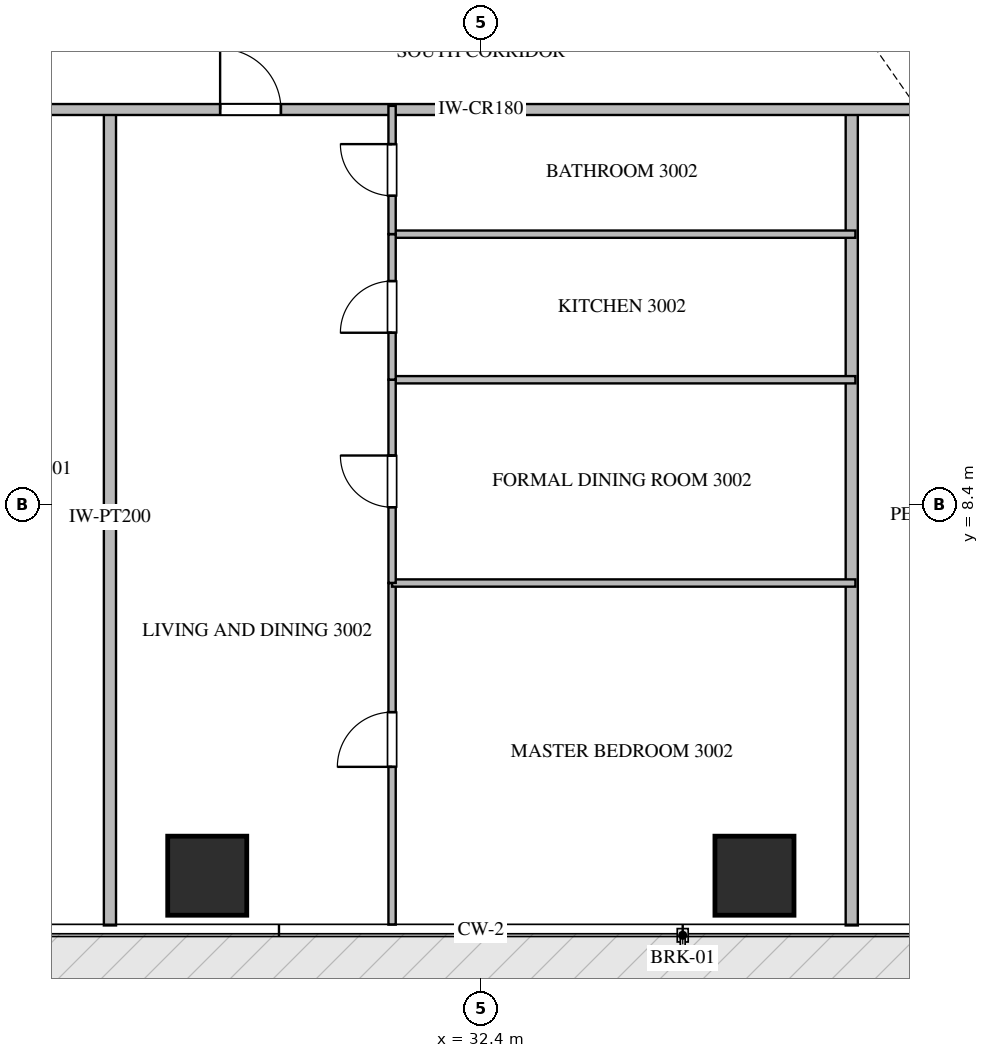
"""IFC4 building model, lengths in metres.
Left out: names, types, materials, properties, quantities, classifications, styles, units other than length and angle.
Written with IfcOpenShell. Run it as: python <this file> out.ifc"""

import sys

from ifc_helpers import new_model, si_unit, direction, frame, frame_2d, origin, origin_2d, place, context, subcontext, project, spatial, rectangle, extrude, source, transform, mapped, element, fill, save


model = new_model("IFC4")
c1 = context("Model", 3, precision=1e-05, world=origin(), true_north=direction((0.0, 1.0)))
c2 = subcontext(c1, "Body", "Model", "MODEL_VIEW")
j1 = project(units=[si_unit("LENGTHUNIT", "METRE"), si_unit("PLANEANGLEUNIT", "RADIAN")], contexts=[c1])
p1 = place(None, origin())
s1 = spatial("IfcSite", under=j1, at=p1, CompositionType="ELEMENT")
p2 = place(p1, origin())
s2 = spatial("IfcBuilding", under=s1, at=p2, CompositionType="ELEMENT")
p3 = place(p2, frame((0.0, 0.0, 123.9)))
s3 = spatial("IfcBuildingStorey", under=s2, at=p3, CompositionType="ELEMENT", Elevation=123.9)
m1 = source(origin(), c2, "Body", "SweptSolid", [
    extrude(rectangle(XDim=1.3, YDim=1.3, at=origin_2d()), origin(), (0.0, 0.0, 1.0), 3.75),
])
for number, where, z_axis, x_axis in (
    (1, (27.9, 2.3, -0.26), (0.0, 0.0, 1.0), (1.0, 0.0, 0.0)),
    (2, (36.9, 2.3, -0.26), (0.0, 0.0, 1.0), (1.0, 0.0, 0.0)),
):
    element("IfcColumn", number, at=place(p3, frame(where, z_axis=z_axis, x_axis=x_axis)), inside=s3, PredefinedType="COLUMN", context=c2, shape_type="MappedRepresentation", body=[
        mapped(m1, transform((0.0, 0.0, 0.0), scale=1.0)),
    ])
for number, where, z_axis, x_axis in (
    (3, (26.3, 1.482, 0.0), (0.0, 0.0, 1.0), (0.0, 1.0, 0.0)),
    (4, (38.5, 1.482, 0.0), (0.0, 0.0, 1.0), (0.0, 1.0, 0.0)),
):
    element("IfcWall", number, at=place(p3, frame(where, z_axis=z_axis, x_axis=x_axis)), inside=s3, PredefinedType="PARTITIONING", context=c2, shape_type="SweptSolid", body=[
        extrude(rectangle(XDim=13.418, YDim=0.2, at=frame_2d((6.709, 0.0))), origin(), (0.0, 0.0, 1.0), 3.49),
    ])
p4 = place(p3, frame((20.952, 14.9, 0.0), z_axis=(0.0, 0.0, 1.0), x_axis=(1.0, 0.0, 0.0)))
e5 = element("IfcWall", 5, at=p4, inside=s3, PredefinedType="PARTITIONING", context=c2, shape_type="SweptSolid", body=[
    extrude(rectangle(XDim=22.896, YDim=0.18, at=frame_2d((11.448, 0.0))), origin(), (0.0, 0.0, 1.0), 3.49),
])
p5 = place(p4, frame((2.781, 0.0, 0.0)))
e6 = element("IfcOpeningElement", 6, at=p5, cuts=e5, PredefinedType="OPENING", context=c2, shape_type="SweptSolid", body=[
    extrude(rectangle(XDim=1.0, YDim=2.15, at=frame_2d((0.5, 1.075))), frame((0.0, 0.1, 0.0), z_axis=(0.0, -1.0, 0.0), x_axis=(1.0, 0.0, 0.0)), (0.0, 0.0, 1.0), 0.2),
])
p6 = place(p4, frame((7.16, 0.0, 0.0)))
e7 = element("IfcOpeningElement", 7, at=p6, cuts=e5, PredefinedType="OPENING", context=c2, shape_type="SweptSolid", body=[
    extrude(rectangle(XDim=1.0, YDim=2.15, at=frame_2d((0.5, 1.075))), frame((0.0, 0.1, 0.0), z_axis=(0.0, -1.0, 0.0), x_axis=(1.0, 0.0, 0.0)), (0.0, 0.0, 1.0), 0.2),
])
p7 = place(p4, frame((19.115, 0.0, 0.0)))
e8 = element("IfcOpeningElement", 8, at=p7, cuts=e5, PredefinedType="OPENING", context=c2, shape_type="SweptSolid", body=[
    extrude(rectangle(XDim=1.0, YDim=2.15, at=frame_2d((0.5, 1.075))), frame((0.0, 0.1, 0.0), z_axis=(0.0, -1.0, 0.0), x_axis=(1.0, 0.0, 0.0)), (0.0, 0.0, 1.0), 0.2),
])
p8 = place(p3, frame((30.94, 1.495, 0.0), z_axis=(0.0, 0.0, 1.0), x_axis=(0.0, 1.0, 0.0)))
e9 = element("IfcWall", 9, at=p8, inside=s3, PredefinedType="PARTITIONING", context=c2, shape_type="SweptSolid", body=[
    extrude(rectangle(XDim=5.618, YDim=0.12, at=frame_2d((2.809, 0.0))), origin(), (0.0, 0.0, 1.0), 3.49),
])
p9 = place(p8, frame((2.595, 0.0, 0.0)))
e10 = element("IfcOpeningElement", 10, at=p9, cuts=e9, PredefinedType="OPENING", context=c2, shape_type="SweptSolid", body=[
    extrude(rectangle(XDim=0.9, YDim=2.1, at=frame_2d((0.45, 1.05))), frame((0.0, 0.07, 0.0), z_axis=(0.0, -1.0, 0.0), x_axis=(1.0, 0.0, 0.0)), (0.0, 0.0, 1.0), 0.14),
])
p10 = place(p3, frame((30.94, 7.113, 0.0), z_axis=(0.0, 0.0, 1.0), x_axis=(1.0, 0.0, 0.0)))
e11 = element("IfcWall", 11, at=p10, inside=s3, PredefinedType="PARTITIONING", context=c2, shape_type="SweptSolid", body=[
    extrude(rectangle(XDim=7.62, YDim=0.12, at=frame_2d((3.81, 0.0))), origin(), (0.0, 0.0, 1.0), 3.49),
])
p11 = place(p3, frame((30.94, 10.456, 0.0), z_axis=(0.0, 0.0, 1.0), x_axis=(1.0, 0.0, 0.0)))
e12 = element("IfcWall", 12, at=p11, inside=s3, PredefinedType="PARTITIONING", context=c2, shape_type="SweptSolid", body=[
    extrude(rectangle(XDim=7.62, YDim=0.12, at=frame_2d((3.81, 0.0))), origin(), (0.0, 0.0, 1.0), 2.972),
])
p12 = place(p3, frame((30.94, 12.85, 0.0), z_axis=(0.0, 0.0, 1.0), x_axis=(1.0, 0.0, 0.0)))
e13 = element("IfcWall", 13, at=p12, inside=s3, PredefinedType="PARTITIONING", context=c2, shape_type="SweptSolid", body=[
    extrude(rectangle(XDim=7.62, YDim=0.12, at=frame_2d((3.81, 0.0))), origin(), (0.0, 0.0, 1.0), 3.49),
])
p13 = place(p3, frame((30.94, 7.115, 0.0), z_axis=(0.0, 0.0, 1.0), x_axis=(0.0, 1.0, 0.0)))
e14 = element("IfcWall", 14, at=p13, inside=s3, PredefinedType="PARTITIONING", context=c2, shape_type="SweptSolid", body=[
    extrude(rectangle(XDim=3.341, YDim=0.12, at=frame_2d((1.67, 0.0))), origin(), (0.0, 0.0, 1.0), 3.49),
])
p14 = place(p13, frame((1.245, 0.0, 0.0)))
e15 = element("IfcOpeningElement", 15, at=p14, cuts=e14, PredefinedType="OPENING", context=c2, shape_type="SweptSolid", body=[
    extrude(rectangle(XDim=0.85, YDim=2.1, at=frame_2d((0.425, 1.05))), frame((0.0, 0.07, 0.0), z_axis=(0.0, -1.0, 0.0), x_axis=(1.0, 0.0, 0.0)), (0.0, 0.0, 1.0), 0.14),
])
p15 = place(p3, frame((30.94, 10.458, 0.0), z_axis=(0.0, 0.0, 1.0), x_axis=(0.0, 1.0, 0.0)))
e16 = element("IfcWall", 16, at=p15, inside=s3, PredefinedType="PARTITIONING", context=c2, shape_type="SweptSolid", body=[
    extrude(rectangle(XDim=2.392, YDim=0.12, at=frame_2d((1.196, 0.0))), origin(), (0.0, 0.0, 1.0), 3.49),
])
p16 = place(p15, frame((0.771, 0.0, 0.0)))
e17 = element("IfcOpeningElement", 17, at=p16, cuts=e16, PredefinedType="OPENING", context=c2, shape_type="SweptSolid", body=[
    extrude(rectangle(XDim=0.85, YDim=2.1, at=frame_2d((0.425, 1.05))), frame((0.0, 0.07, 0.0), z_axis=(0.0, -1.0, 0.0), x_axis=(1.0, 0.0, 0.0)), (0.0, 0.0, 1.0), 0.14),
])
p17 = place(p3, frame((30.94, 12.852, 0.0), z_axis=(0.0, 0.0, 1.0), x_axis=(0.0, 1.0, 0.0)))
e18 = element("IfcWall", 18, at=p17, inside=s3, PredefinedType="PARTITIONING", context=c2, shape_type="SweptSolid", body=[
    extrude(rectangle(XDim=2.108, YDim=0.12, at=frame_2d((1.054, 0.0))), origin(), (0.0, 0.0, 1.0), 3.49),
])
p18 = place(p17, frame((0.629, 0.0, 0.0)))
e19 = element("IfcOpeningElement", 19, at=p18, cuts=e18, PredefinedType="OPENING", context=c2, shape_type="SweptSolid", body=[
    extrude(rectangle(XDim=0.85, YDim=2.1, at=frame_2d((0.425, 1.05))), frame((0.0, 0.07, 0.0), z_axis=(0.0, -1.0, 0.0), x_axis=(1.0, 0.0, 0.0)), (0.0, 0.0, 1.0), 0.14),
])
m2 = source(origin(), c2, "Body", "SweptSolid", [
    extrude(rectangle(XDim=1.0, YDim=2.15, at=frame_2d((0.5, 1.075))), frame((0.0, 0.025, 0.0), z_axis=(0.0, -1.0, 0.0), x_axis=(1.0, 0.0, 0.0)), (0.0, 0.0, 1.0), 0.05),
])
p19 = place(p6, origin())
e20 = element("IfcDoor", 20, at=p19, inside=s3, OperationType="SINGLE_SWING_LEFT", PredefinedType="DOOR", context=c2, shape_type="MappedRepresentation", body=[
    mapped(m2, transform((0.0, 0.0, 0.0), scale=1.0)),
])
fill(e7, e20)
m3 = source(origin(), c2, "Body", "SweptSolid", [
    extrude(rectangle(XDim=0.9, YDim=2.1, at=frame_2d((0.45, 1.05))), frame((0.0, 0.025, 0.0), z_axis=(0.0, -1.0, 0.0), x_axis=(1.0, 0.0, 0.0)), (0.0, 0.0, 1.0), 0.05),
])
p20 = place(p9, origin())
e21 = element("IfcDoor", 21, at=p20, inside=s3, OperationType="SINGLE_SWING_LEFT", PredefinedType="DOOR", context=c2, shape_type="MappedRepresentation", body=[
    mapped(m3, transform((0.0, 0.0, 0.0), scale=1.0)),
])
fill(e10, e21)
m4 = source(origin(), c2, "Body", "SweptSolid", [
    extrude(rectangle(XDim=0.85, YDim=2.1, at=frame_2d((0.425, 1.05))), frame((0.0, 0.025, 0.0), z_axis=(0.0, -1.0, 0.0), x_axis=(1.0, 0.0, 0.0)), (0.0, 0.0, 1.0), 0.05),
])
p21 = place(p14, origin())
e22 = element("IfcDoor", 22, at=p21, inside=s3, OperationType="SINGLE_SWING_RIGHT", PredefinedType="DOOR", context=c2, shape_type="MappedRepresentation", body=[
    mapped(m4, transform((0.0, 0.0, 0.0), scale=1.0)),
])
fill(e15, e22)
p22 = place(p16, origin())
e23 = element("IfcDoor", 23, at=p22, inside=s3, OperationType="SINGLE_SWING_LEFT", PredefinedType="DOOR", context=c2, shape_type="MappedRepresentation", body=[
    mapped(m4, transform((0.0, 0.0, 0.0), scale=1.0)),
])
fill(e17, e23)
p23 = place(p18, origin())
e24 = element("IfcDoor", 24, at=p23, inside=s3, OperationType="SINGLE_SWING_RIGHT", PredefinedType="DOOR", context=c2, shape_type="MappedRepresentation", body=[
    mapped(m4, transform((0.0, 0.0, 0.0), scale=1.0)),
])
fill(e19, e24)
save(model, sys.argv[1])
